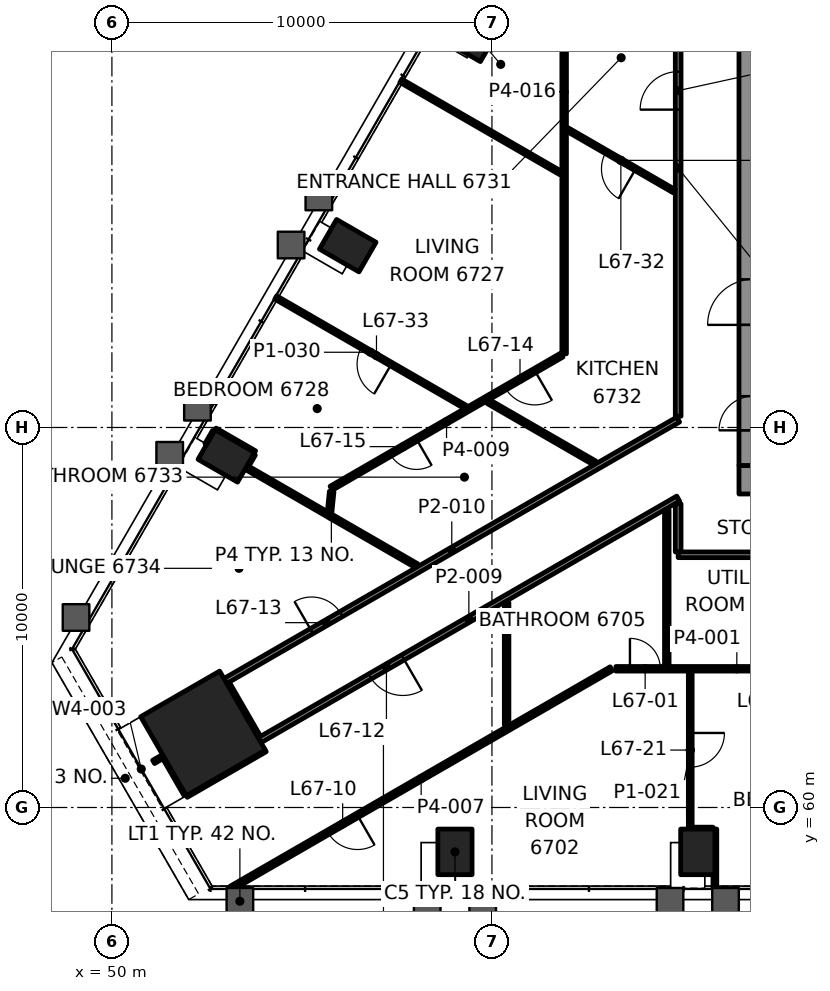
"""IFC4 building model, lengths in metres.
Left out: names, types, materials, properties, quantities, classifications, styles, units other than length and angle.
Written with IfcOpenShell. Run it as: python <this file> out.ifc"""

import sys

from ifc_helpers import new_model, si_unit, direction, frame, frame_2d, origin, origin_2d, place, context, subcontext, project, spatial, rectangle, hollow_rectangle, extrude, element, fill, save


model = new_model("IFC4")
c1 = context("Model", 3, precision=1e-05, world=origin(), true_north=direction((0.0, 1.0)))
c2 = subcontext(c1, "Body", "Model", "MODEL_VIEW")
j1 = project(units=[si_unit("LENGTHUNIT", "METRE"), si_unit("PLANEANGLEUNIT", "RADIAN")], contexts=[c1])
p1 = place(None, origin())
s1 = spatial("IfcSite", under=j1, at=p1, CompositionType="ELEMENT")
p2 = place(p1, origin())
s2 = spatial("IfcBuilding", under=s1, at=p2, CompositionType="ELEMENT")
p3 = place(p2, frame((0.0, 0.0, 281.1)))
s3 = spatial("IfcBuildingStorey", under=s2, at=p3, CompositionType="ELEMENT", Elevation=281.1)
p4 = place(p3, frame((52.396, 61.95, 0.0), z_axis=(0.0, 0.0, 1.0), x_axis=(0.5, -0.866025403784, 0.0)))
e1 = element("IfcColumn", 1, at=p4, inside=s3, PredefinedType="COLUMN", context=c2, shape_type="SweptSolid", body=[
    extrude(rectangle(XDim=2.4, YDim=2.4, at=origin_2d()), origin(), (0.0, 0.0, 1.0), 3.5),
])
for number, where, z_axis, x_axis in (
    (2, (59.027, 58.832, -0.0), (0.0, 0.0, 1.0), (1.0, 0.0, 0.0)),
    (3, (65.416, 58.832, -0.0), (0.0, 0.0, 1.0), (1.0, 0.0, 0.0)),
    (4, (59.401, 80.317, -0.0), (0.0, 0.0, 1.0), (-0.5, -0.866, 0.0)),
    (5, (56.206, 74.784, -0.0), (0.0, 0.0, 1.0), (-0.5, -0.866, 0.0)),
    (6, (53.011, 69.251, -0.0), (0.0, 0.0, 1.0), (-0.5, -0.866, 0.0)),
):
    element("IfcColumn", number, at=place(p3, frame(where, z_axis=z_axis, x_axis=x_axis)), inside=s3, PredefinedType="COLUMN", context=c2, shape_type="SweptSolid", body=[
        extrude(hollow_rectangle(XDim=0.9, YDim=1.2, WallThickness=0.06, at=origin_2d()), origin(), (0.0, 0.0, 1.0), 3.5),
    ])
p5 = place(p3, frame((66.5, 68.625, 0.0), z_axis=(0.0, 0.0, 1.0), x_axis=(1.0, 0.0, 0.0)))
e7 = element("IfcWall", 7, at=p5, inside=s3, PredefinedType="SHEAR", context=c2, shape_type="SweptSolid", body=[
    extrude(rectangle(XDim=17.0, YDim=0.75, at=frame_2d((8.5, 0.0))), origin(), (0.0, 0.0, 1.0), 3.3),
])
p6 = place(p5, frame((2.7, 0.0, 0.0)))
e8 = element("IfcOpeningElement", 8, at=p6, cuts=e7, PredefinedType="OPENING", context=c2, shape_type="SweptSolid", body=[
    extrude(rectangle(XDim=0.9, YDim=2.1, at=frame_2d((0.45, 1.05))), frame((0.0, 0.385, 0.0), z_axis=(0.0, -1.0, 0.0), x_axis=(1.0, 0.0, 0.0)), (0.0, 0.0, 1.0), 0.77),
])
p7 = place(p3, frame((66.875, 69.0, 0.0), z_axis=(0.0, 0.0, 1.0), x_axis=(0.0, 1.0, 0.0)))
e9 = element("IfcWall", 9, at=p7, inside=s3, PredefinedType="SHEAR", context=c2, shape_type="SweptSolid", body=[
    extrude(rectangle(XDim=12.0, YDim=0.75, at=frame_2d((6.0, 0.0))), origin(), (0.0, 0.0, 1.0), 3.3),
])
p8 = place(p7, frame((3.7, 0.0, 0.0)))
e10 = element("IfcOpeningElement", 10, at=p8, cuts=e9, PredefinedType="OPENING", context=c2, shape_type="SweptSolid", body=[
    extrude(rectangle(XDim=1.2, YDim=2.1, at=frame_2d((0.6, 1.05))), frame((0.0, 0.385, 0.0), z_axis=(0.0, -1.0, 0.0), x_axis=(1.0, 0.0, 0.0)), (0.0, 0.0, 1.0), 0.77),
])
p9 = place(p7, frame((0.925, 0.0, 0.0)))
e11 = element("IfcOpeningElement", 11, at=p9, cuts=e9, PredefinedType="OPENING", context=c2, shape_type="SweptSolid", body=[
    extrude(rectangle(XDim=0.9, YDim=2.1, at=frame_2d((0.45, 1.05))), frame((0.0, 0.385, 0.0), z_axis=(0.0, -1.0, 0.0), x_axis=(1.0, 0.0, 0.0)), (0.0, 0.0, 1.0), 0.77),
])
p10 = place(p3, frame((65.268, 59.432, 0.0), z_axis=(0.0, 0.0, 1.0), x_axis=(1.0, 0.0, 0.0)))
e12 = element("IfcWall", 12, at=p10, inside=s3, PredefinedType="PARTITIONING", context=c2, shape_type="SweptSolid", body=[
    extrude(rectangle(XDim=0.548, YDim=0.1, at=frame_2d((0.274, 0.0))), origin(), (0.0, 0.0, 1.0), 2.7),
])
p11 = place(p3, frame((63.261, 63.65, 0.0), z_axis=(0.0, 0.0, 1.0), x_axis=(1.0, 0.0, 0.0)))
e13 = element("IfcWall", 13, at=p11, inside=s3, PredefinedType="PARTITIONING", context=c2, shape_type="SweptSolid", body=[
    extrude(rectangle(XDim=6.364, YDim=0.12, at=frame_2d((3.182, 0.0))), origin(), (0.0, 0.0, 1.0), 2.7),
])
p12 = place(p11, frame((0.37, 0.0, 0.0)))
e14 = element("IfcOpeningElement", 14, at=p12, cuts=e13, PredefinedType="OPENING", context=c2, shape_type="SweptSolid", body=[
    extrude(rectangle(XDim=0.8, YDim=2.1, at=frame_2d((0.4, 1.05))), frame((0.0, 0.07, 0.0), z_axis=(0.0, -1.0, 0.0), x_axis=(1.0, 0.0, 0.0)), (0.0, 0.0, 1.0), 0.14),
])
p13 = place(p11, frame((3.609, 0.0, 0.0)))
e15 = element("IfcOpeningElement", 15, at=p13, cuts=e13, PredefinedType="OPENING", context=c2, shape_type="SweptSolid", body=[
    extrude(rectangle(XDim=0.9, YDim=2.1, at=frame_2d((0.45, 1.05))), frame((0.0, 0.07, 0.0), z_axis=(0.0, -1.0, 0.0), x_axis=(1.0, 0.0, 0.0)), (0.0, 0.0, 1.0), 0.14),
])
p14 = place(p3, frame((85.1, 66.65, 0.0), z_axis=(0.0, 0.0, 1.0), x_axis=(-1.0, 0.0, 0.0)))
e16 = element("IfcWall", 16, at=p14, inside=s3, PredefinedType="PARTITIONING", context=c2, shape_type="SweptSolid", body=[
    extrude(rectangle(XDim=20.2, YDim=0.15, at=frame_2d((10.1, 0.0))), origin(), (0.0, 0.0, 1.0), 2.7),
])
p15 = place(p14, frame((6.405, 0.0, 0.0)))
e17 = element("IfcOpeningElement", 17, at=p15, cuts=e16, PredefinedType="OPENING", context=c2, shape_type="SweptSolid", body=[
    extrude(rectangle(XDim=1.0, YDim=2.1, at=frame_2d((0.5, 1.05))), frame((0.0, 0.085, 0.0), z_axis=(0.0, -1.0, 0.0), x_axis=(1.0, 0.0, 0.0)), (0.0, 0.0, 1.0), 0.17),
])
p16 = place(p14, frame((12.845, 0.0, 0.0)))
e18 = element("IfcOpeningElement", 18, at=p16, cuts=e16, PredefinedType="OPENING", context=c2, shape_type="SweptSolid", body=[
    extrude(rectangle(XDim=0.9, YDim=2.1, at=frame_2d((0.45, 1.05))), frame((0.0, 0.085, 0.0), z_axis=(0.0, -1.0, 0.0), x_axis=(1.0, 0.0, 0.0)), (0.0, 0.0, 1.0), 0.17),
])
p17 = place(p3, frame((63.141, 63.65, 0.0), z_axis=(0.0, 0.0, 1.0), x_axis=(-0.866023045711, -0.500004084281, 0.0)))
e19 = element("IfcWall", 19, at=p17, inside=s3, PredefinedType="PARTITIONING", context=c2, shape_type="SweptSolid", body=[
    extrude(rectangle(XDim=11.556, YDim=0.12, at=frame_2d((5.778, 0.0))), origin(), (0.0, 0.0, 1.0), 2.7),
])
p18 = place(p17, frame((7.713, 0.0, 0.0)))
e20 = element("IfcOpeningElement", 20, at=p18, cuts=e19, PredefinedType="OPENING", context=c2, shape_type="SweptSolid", body=[
    extrude(rectangle(XDim=0.9, YDim=2.1, at=frame_2d((0.45, 1.05))), frame((0.0, 0.07, 0.0), z_axis=(0.0, -1.0, 0.0), x_axis=(1.0, 0.0, 0.0)), (0.0, 0.0, 1.0), 0.14),
])
p19 = place(p3, frame((51.957, 60.311, 0.0), z_axis=(0.0, 0.0, 1.0), x_axis=(0.866036455013, 0.499980858223, 0.0)))
e21 = element("IfcWall", 21, at=p19, inside=s3, PredefinedType="PARTITIONING", context=c2, shape_type="SweptSolid", body=[
    extrude(rectangle(XDim=2.399, YDim=0.1, at=frame_2d((1.199, 0.0))), origin(), (0.0, 0.0, 1.0), 2.7),
])
p20 = place(p3, frame((64.9, 68.13, 0.0), z_axis=(0.0, 0.0, 1.0), x_axis=(-0.866023199005, -0.500003818771, 0.0)))
e22 = element("IfcWall", 22, at=p20, inside=s3, PredefinedType="PARTITIONING", context=c2, shape_type="SweptSolid", body=[
    extrude(rectangle(XDim=12.719, YDim=0.15, at=frame_2d((6.359, 0.0))), origin(), (0.0, 0.0, 1.0), 2.547),
])
p21 = place(p20, frame((8.364, 0.0, 0.0)))
e23 = element("IfcOpeningElement", 23, at=p21, cuts=e22, PredefinedType="OPENING", context=c2, shape_type="SweptSolid", body=[
    extrude(rectangle(XDim=1.0, YDim=2.1, at=frame_2d((0.5, 1.05))), frame((0.0, 0.085, 0.0), z_axis=(0.0, -1.0, 0.0), x_axis=(1.0, 0.0, 0.0)), (0.0, 0.0, 1.0), 0.17),
])
p22 = place(p3, frame((51.097, 61.2, 0.0), z_axis=(0.0, 0.0, 1.0), x_axis=(0.866006330792, 0.500033033937, 0.0)))
e24 = element("IfcWall", 24, at=p22, inside=s3, PredefinedType="PARTITIONING", context=c2, shape_type="SweptSolid", body=[
    extrude(rectangle(XDim=0.25, YDim=0.1, at=frame_2d((0.125, 0.0))), origin(), (0.0, 0.0, 1.0), 2.7),
])
p23 = place(p3, frame((52.986, 63.329, 0.0), z_axis=(0.0, 0.0, 1.0), x_axis=(0.866027482275, 0.499996399932, 0.0)))
e25 = element("IfcWall", 25, at=p23, inside=s3, PredefinedType="PARTITIONING", context=c2, shape_type="SweptSolid", body=[
    extrude(rectangle(XDim=13.757, YDim=0.15, at=frame_2d((6.879, 0.0))), origin(), (0.0, 0.0, 1.0), 2.7),
])
p24 = place(p23, frame((2.62, 0.0, 0.0)))
e26 = element("IfcOpeningElement", 26, at=p24, cuts=e25, PredefinedType="OPENING", context=c2, shape_type="SweptSolid", body=[
    extrude(rectangle(XDim=0.9, YDim=2.1, at=frame_2d((0.45, 1.05))), frame((0.0, 0.085, 0.0), z_axis=(0.0, -1.0, 0.0), x_axis=(1.0, 0.0, 0.0)), (0.0, 0.0, 1.0), 0.17),
])
p25 = place(p3, frame((61.84, 71.906, 0.0), z_axis=(0.0, 0.0, 1.0), x_axis=(-0.866015603583, -0.500016974063, 0.0)))
e27 = element("IfcWall", 27, at=p25, inside=s3, PredefinedType="PARTITIONING", context=c2, shape_type="SweptSolid", body=[
    extrude(rectangle(XDim=7.008, YDim=0.12, at=frame_2d((3.504, 0.0))), origin(), (0.0, 0.0, 1.0), 2.7),
])
p26 = place(p25, frame((0.822, 0.0, 0.0)))
e28 = element("IfcOpeningElement", 28, at=p26, cuts=e27, PredefinedType="OPENING", context=c2, shape_type="SweptSolid", body=[
    extrude(rectangle(XDim=0.9, YDim=2.1, at=frame_2d((0.45, 1.05))), frame((0.0, 0.07, 0.0), z_axis=(0.0, -1.0, 0.0), x_axis=(1.0, 0.0, 0.0)), (0.0, 0.0, 1.0), 0.14),
])
p27 = place(p25, frame((4.418, 0.0, 0.0)))
e29 = element("IfcOpeningElement", 29, at=p27, cuts=e27, PredefinedType="OPENING", context=c2, shape_type="SweptSolid", body=[
    extrude(rectangle(XDim=0.8, YDim=2.1, at=frame_2d((0.4, 1.05))), frame((0.0, 0.07, 0.0), z_axis=(0.0, -1.0, 0.0), x_axis=(1.0, 0.0, 0.0)), (0.0, 0.0, 1.0), 0.14),
])
p28 = place(p3, frame((53.561, 69.003, 0.0), z_axis=(0.0, 0.0, 1.0), x_axis=(0.500241622161, 0.865885858216, 0.0)))
e30 = element("IfcWall", 30, at=p28, inside=s3, PredefinedType="PARTITIONING", context=c2, shape_type="SweptSolid", body=[
    extrude(rectangle(XDim=0.339, YDim=0.1, at=frame_2d((0.169, 0.0))), origin(), (0.0, 0.0, 1.0), 2.7),
])
p29 = place(p3, frame((52.491, 69.551, 0.0), z_axis=(0.0, 0.0, 1.0), x_axis=(0.499951716245, 0.866053278629, 0.0)))
e31 = element("IfcWall", 31, at=p29, inside=s3, PredefinedType="PARTITIONING", context=c2, shape_type="SweptSolid", body=[
    extrude(rectangle(XDim=0.399, YDim=0.1, at=frame_2d((0.2, 0.0))), origin(), (0.0, 0.0, 1.0), 2.7),
])
p30 = place(p3, frame((55.729, 67.781, 0.0), z_axis=(0.0, 0.0, 1.0), x_axis=(0.099548724898, 0.995032688594, 0.0)))
e32 = element("IfcWall", 32, at=p30, inside=s3, PredefinedType="PARTITIONING", context=c2, shape_type="SweptSolid", body=[
    extrude(rectangle(XDim=0.537, YDim=0.12, at=frame_2d((0.269, 0.0))), origin(), (0.0, 0.0, 1.0), 2.7),
])
p31 = place(p3, frame((65.866, 57.872, 0.0), z_axis=(0.0, 0.0, 1.0), x_axis=(0.0, 1.0, 0.0)))
e33 = element("IfcWall", 33, at=p31, inside=s3, PredefinedType="PARTITIONING", context=c2, shape_type="SweptSolid", body=[
    extrude(rectangle(XDim=1.56, YDim=0.1, at=frame_2d((0.78, 0.0))), origin(), (0.0, 0.0, 1.0), 2.688),
])
p32 = place(p3, frame((65.218, 63.59, 0.0), z_axis=(0.0, 0.0, 1.0), x_axis=(0.0, -1.0, 0.0)))
e34 = element("IfcWall", 34, at=p32, inside=s3, PredefinedType="PARTITIONING", context=c2, shape_type="SweptSolid", body=[
    extrude(rectangle(XDim=4.158, YDim=0.1, at=frame_2d((2.079, 0.0))), origin(), (0.0, 0.0, 1.0), 2.7),
])
p33 = place(p32, frame((1.629, 0.0, 0.0)))
e35 = element("IfcOpeningElement", 35, at=p33, cuts=e34, PredefinedType="OPENING", context=c2, shape_type="SweptSolid", body=[
    extrude(rectangle(XDim=0.9, YDim=2.1, at=frame_2d((0.45, 1.05))), frame((0.0, 0.06, 0.0), z_axis=(0.0, -1.0, 0.0), x_axis=(1.0, 0.0, 0.0)), (0.0, 0.0, 1.0), 0.12),
])
p34 = place(p3, frame((64.9, 66.725, 0.0), z_axis=(0.0, 0.0, 1.0), x_axis=(0.0, 1.0, 0.0)))
e36 = element("IfcWall", 36, at=p34, inside=s3, PredefinedType="PARTITIONING", context=c2, shape_type="SweptSolid", body=[
    extrude(rectangle(XDim=1.268, YDim=0.15, at=frame_2d((0.634, 0.0))), origin(), (0.0, 0.0, 1.0), 2.547),
])
p35 = place(p3, frame((64.9, 70.295, 0.0), z_axis=(0.0, 0.0, 1.0), x_axis=(0.0, 1.0, 0.0)))
e37 = element("IfcWall", 37, at=p35, inside=s3, PredefinedType="PARTITIONING", context=c2, shape_type="SweptSolid", body=[
    extrude(rectangle(XDim=13.055, YDim=0.15, at=frame_2d((6.528, 0.0))), origin(), (0.0, 0.0, 1.0), 2.7),
])
p36 = place(p35, frame((8.07, 0.0, 0.0)))
e38 = element("IfcOpeningElement", 38, at=p36, cuts=e37, PredefinedType="OPENING", context=c2, shape_type="SweptSolid", body=[
    extrude(rectangle(XDim=1.0, YDim=2.1, at=frame_2d((0.5, 1.05))), frame((0.0, 0.085, 0.0), z_axis=(0.0, -1.0, 0.0), x_axis=(1.0, 0.0, 0.0)), (0.0, 0.0, 1.0), 0.17),
])
p37 = place(p3, frame((64.601, 63.71, 0.0), z_axis=(0.0, 0.0, 1.0), x_axis=(0.0, 1.0, 0.0)))
e39 = element("IfcWall", 39, at=p37, inside=s3, PredefinedType="PARTITIONING", context=c2, shape_type="SweptSolid", body=[
    extrude(rectangle(XDim=4.12, YDim=0.12, at=frame_2d((2.06, 0.0))), origin(), (0.0, 0.0, 1.0), 2.547),
])
p38 = place(p3, frame((61.9, 71.94, 0.0), z_axis=(0.0, 0.0, 1.0), x_axis=(0.0, 1.0, 0.0)))
e40 = element("IfcWall", 40, at=p38, inside=s3, PredefinedType="PARTITIONING", context=c2, shape_type="SweptSolid", body=[
    extrude(rectangle(XDim=13.792, YDim=0.12, at=frame_2d((6.896, 0.0))), origin(), (0.0, 0.0, 1.0), 2.688),
])
p39 = place(p38, frame((8.206, 0.0, 0.0)))
e41 = element("IfcOpeningElement", 41, at=p39, cuts=e40, PredefinedType="OPENING", context=c2, shape_type="SweptSolid", body=[
    extrude(rectangle(XDim=0.9, YDim=2.1, at=frame_2d((0.45, 1.05))), frame((0.0, 0.07, 0.0), z_axis=(0.0, -1.0, 0.0), x_axis=(1.0, 0.0, 0.0)), (0.0, 0.0, 1.0), 0.14),
])
p40 = place(p3, frame((60.386, 62.169, 0.0), z_axis=(0.0, 0.0, 1.0), x_axis=(0.0, 1.0, 0.0)))
e42 = element("IfcWall", 42, at=p40, inside=s3, PredefinedType="PARTITIONING", context=c2, shape_type="SweptSolid", body=[
    extrude(rectangle(XDim=3.228, YDim=0.12, at=frame_2d((1.614, 0.0))), origin(), (0.0, 0.0, 1.0), 2.547),
])
p41 = place(p3, frame((53.845, 61.84, 0.0), z_axis=(0.0, 0.0, 1.0), x_axis=(-0.499988108725, 0.866032269107, 0.0)))
e43 = element("IfcWall", 43, at=p41, inside=s3, PredefinedType="PARTITIONING", context=c2, shape_type="SweptSolid", body=[
    extrude(rectangle(XDim=1.644, YDim=0.15, at=frame_2d((0.822, 0.0))), origin(), (0.0, 0.0, 1.0), 2.547),
])
p42 = place(p3, frame((51.931, 60.354, 0.0), z_axis=(0.0, 0.0, 1.0), x_axis=(-0.499955427682, 0.866051136095, 0.0)))
e44 = element("IfcWall", 44, at=p42, inside=s3, PredefinedType="PARTITIONING", context=c2, shape_type="SweptSolid", body=[
    extrude(rectangle(XDim=1.149, YDim=0.1, at=frame_2d((0.574, 0.0))), origin(), (0.0, 0.0, 1.0), 2.7),
])
p43 = place(p3, frame((64.799, 76.217, 0.0), z_axis=(0.0, 0.0, 1.0), x_axis=(-0.866000336211, 0.500043415797, 0.0)))
e45 = element("IfcWall", 45, at=p43, inside=s3, PredefinedType="PARTITIONING", context=c2, shape_type="SweptSolid", body=[
    extrude(rectangle(XDim=3.248, YDim=0.1, at=frame_2d((1.624, 0.0))), origin(), (0.0, 0.0, 1.0), 2.7),
])
p44 = place(p43, frame((1.174, 0.0, 0.0)))
e46 = element("IfcOpeningElement", 46, at=p44, cuts=e45, PredefinedType="OPENING", context=c2, shape_type="SweptSolid", body=[
    extrude(rectangle(XDim=0.9, YDim=2.1, at=frame_2d((0.45, 1.05))), frame((0.0, 0.06, 0.0), z_axis=(0.0, -1.0, 0.0), x_axis=(1.0, 0.0, 0.0)), (0.0, 0.0, 1.0), 0.12),
])
p45 = place(p3, frame((61.814, 76.693, 0.0), z_axis=(0.0, 0.0, 1.0), x_axis=(-0.866028392017, 0.499994824194, 0.0)))
e47 = element("IfcWall", 47, at=p45, inside=s3, PredefinedType="PARTITIONING", context=c2, shape_type="SweptSolid", body=[
    extrude(rectangle(XDim=4.862, YDim=0.1, at=frame_2d((2.431, 0.0))), origin(), (0.0, 0.0, 1.0), 2.688),
])
p46 = place(p3, frame((62.702, 69.066, 0.0), z_axis=(0.0, 0.0, 1.0), x_axis=(-0.866033195618, 0.499986503906, 0.0)))
e48 = element("IfcWall", 48, at=p46, inside=s3, PredefinedType="PARTITIONING", context=c2, shape_type="SweptSolid", body=[
    extrude(rectangle(XDim=3.228, YDim=0.12, at=frame_2d((1.614, 0.0))), origin(), (0.0, 0.0, 1.0), 2.7),
])
p47 = place(p3, frame((59.301, 70.539, 0.0), z_axis=(0.0, 0.0, 1.0), x_axis=(-0.866021213215, 0.500007258209, 0.0)))
e49 = element("IfcWall", 49, at=p47, inside=s3, PredefinedType="PARTITIONING", context=c2, shape_type="SweptSolid", body=[
    extrude(rectangle(XDim=5.763, YDim=0.1, at=frame_2d((2.882, 0.0))), origin(), (0.0, 0.0, 1.0), 2.7),
])
p48 = place(p47, frame((2.252, 0.0, 0.0)))
e50 = element("IfcOpeningElement", 50, at=p48, cuts=e49, PredefinedType="OPENING", context=c2, shape_type="SweptSolid", body=[
    extrude(rectangle(XDim=0.9, YDim=2.1, at=frame_2d((0.45, 1.05))), frame((0.0, 0.06, 0.0), z_axis=(0.0, -1.0, 0.0), x_axis=(1.0, 0.0, 0.0)), (0.0, 0.0, 1.0), 0.12),
])
p49 = place(p3, frame((53.756, 69.341, 0.0), z_axis=(0.0, 0.0, 1.0), x_axis=(-0.866066905393, 0.499928110214, 0.0)))
e51 = element("IfcWall", 51, at=p49, inside=s3, PredefinedType="PARTITIONING", context=c2, shape_type="SweptSolid", body=[
    extrude(rectangle(XDim=1.199, YDim=0.1, at=frame_2d((0.6, 0.0))), origin(), (0.0, 0.0, 1.0), 2.7),
])
p50 = place(p3, frame((58.017, 66.361, 0.0), z_axis=(0.0, 0.0, 1.0), x_axis=(-0.866018392704, 0.500012143352, 0.0)))
e52 = element("IfcWall", 52, at=p50, inside=s3, PredefinedType="PARTITIONING", context=c2, shape_type="SweptSolid", body=[
    extrude(rectangle(XDim=5.179, YDim=0.12, at=frame_2d((2.59, 0.0))), origin(), (0.0, 0.0, 1.0), 2.7),
])
p51 = place(p3, frame((48.551, 63.887, 0.0), z_axis=(0.0, 0.0, 1.0), x_axis=(0.499986626058, -0.866033125095, 0.0)))
e53 = element("IfcWall", 53, at=p51, inside=s3, PredefinedType="PARAPET", context=c2, shape_type="SweptSolid", body=[
    extrude(rectangle(XDim=7.2, YDim=0.3, at=frame_2d((3.6, 0.0))), origin(), (0.0, 0.0, 1.0), 1.1),
])
p52 = place(p12, origin())
e54 = element("IfcDoor", 54, at=p52, inside=s3, OperationType="SINGLE_SWING_RIGHT", PredefinedType="DOOR", context=c2, shape_type="SweptSolid", body=[
    extrude(rectangle(XDim=0.8, YDim=2.1, at=frame_2d((0.4, 1.05))), frame((0.0, 0.025, 0.0), z_axis=(0.0, -1.0, 0.0), x_axis=(1.0, 0.0, 0.0)), (0.0, 0.0, 1.0), 0.05),
])
fill(e14, e54)
p53 = place(p18, origin())
e55 = element("IfcDoor", 55, at=p53, inside=s3, OperationType="SINGLE_SWING_RIGHT", PredefinedType="DOOR", context=c2, shape_type="SweptSolid", body=[
    extrude(rectangle(XDim=0.9, YDim=2.1, at=frame_2d((0.45, 1.05))), frame((0.0, 0.025, 0.0), z_axis=(0.0, -1.0, 0.0), x_axis=(1.0, 0.0, 0.0)), (0.0, 0.0, 1.0), 0.05),
])
fill(e20, e55)
p54 = place(p21, origin())
e56 = element("IfcDoor", 56, at=p54, inside=s3, OperationType="SINGLE_SWING_LEFT", PredefinedType="DOOR", context=c2, shape_type="SweptSolid", body=[
    extrude(rectangle(XDim=1.0, YDim=2.1, at=frame_2d((0.5, 1.05))), frame((0.0, 0.025, 0.0), z_axis=(0.0, -1.0, 0.0), x_axis=(1.0, 0.0, 0.0)), (0.0, 0.0, 1.0), 0.05),
])
fill(e23, e56)
p55 = place(p24, origin())
e57 = element("IfcDoor", 57, at=p55, inside=s3, OperationType="SINGLE_SWING_LEFT", PredefinedType="DOOR", context=c2, shape_type="SweptSolid", body=[
    extrude(rectangle(XDim=0.9, YDim=2.1, at=frame_2d((0.45, 1.05))), frame((0.0, 0.025, 0.0), z_axis=(0.0, -1.0, 0.0), x_axis=(1.0, 0.0, 0.0)), (0.0, 0.0, 1.0), 0.05),
])
fill(e26, e57)
p56 = place(p26, origin())
e58 = element("IfcDoor", 58, at=p56, inside=s3, OperationType="SINGLE_SWING_LEFT", PredefinedType="DOOR", context=c2, shape_type="SweptSolid", body=[
    extrude(rectangle(XDim=0.9, YDim=2.1, at=frame_2d((0.45, 1.05))), frame((0.0, 0.025, 0.0), z_axis=(0.0, -1.0, 0.0), x_axis=(1.0, 0.0, 0.0)), (0.0, 0.0, 1.0), 0.05),
])
fill(e28, e58)
p57 = place(p27, origin())
e59 = element("IfcDoor", 59, at=p57, inside=s3, OperationType="SINGLE_SWING_LEFT", PredefinedType="DOOR", context=c2, shape_type="SweptSolid", body=[
    extrude(rectangle(XDim=0.8, YDim=2.1, at=frame_2d((0.4, 1.05))), frame((0.0, 0.025, 0.0), z_axis=(0.0, -1.0, 0.0), x_axis=(1.0, 0.0, 0.0)), (0.0, 0.0, 1.0), 0.05),
])
fill(e29, e59)
p58 = place(p33, origin())
e60 = element("IfcDoor", 60, at=p58, inside=s3, OperationType="SINGLE_SWING_RIGHT", PredefinedType="DOOR", context=c2, shape_type="SweptSolid", body=[
    extrude(rectangle(XDim=0.9, YDim=2.1, at=frame_2d((0.45, 1.05))), frame((0.0, 0.025, 0.0), z_axis=(0.0, -1.0, 0.0), x_axis=(1.0, 0.0, 0.0)), (0.0, 0.0, 1.0), 0.05),
])
fill(e35, e60)
p59 = place(p36, origin())
e61 = element("IfcDoor", 61, at=p59, inside=s3, OperationType="SINGLE_SWING_RIGHT", PredefinedType="DOOR", context=c2, shape_type="SweptSolid", body=[
    extrude(rectangle(XDim=1.0, YDim=2.1, at=frame_2d((0.5, 1.05))), frame((0.0, 0.025, 0.0), z_axis=(0.0, -1.0, 0.0), x_axis=(1.0, 0.0, 0.0)), (0.0, 0.0, 1.0), 0.05),
])
fill(e38, e61)
p60 = place(p44, origin())
e62 = element("IfcDoor", 62, at=p60, inside=s3, OperationType="SINGLE_SWING_LEFT", PredefinedType="DOOR", context=c2, shape_type="SweptSolid", body=[
    extrude(rectangle(XDim=0.9, YDim=2.1, at=frame_2d((0.45, 1.05))), frame((0.0, 0.025, 0.0), z_axis=(0.0, -1.0, 0.0), x_axis=(1.0, 0.0, 0.0)), (0.0, 0.0, 1.0), 0.05),
])
fill(e46, e62)
p61 = place(p48, origin())
e63 = element("IfcDoor", 63, at=p61, inside=s3, OperationType="SINGLE_SWING_LEFT", PredefinedType="DOOR", context=c2, shape_type="SweptSolid", body=[
    extrude(rectangle(XDim=0.9, YDim=2.1, at=frame_2d((0.45, 1.05))), frame((0.0, 0.025, 0.0), z_axis=(0.0, -1.0, 0.0), x_axis=(1.0, 0.0, 0.0)), (0.0, 0.0, 1.0), 0.05),
])
fill(e50, e63)
p62 = place(p8, origin())
e64 = element("IfcDoor", 64, at=p62, inside=s3, OperationType="SINGLE_SWING_RIGHT", PredefinedType="DOOR", context=c2, shape_type="SweptSolid", body=[
    extrude(rectangle(XDim=1.2, YDim=2.1, at=frame_2d((0.6, 1.05))), frame((0.0, 0.095, 0.0), z_axis=(0.0, -1.0, 0.0), x_axis=(1.0, 0.0, 0.0)), (0.0, 0.0, 1.0), 0.19),
])
fill(e10, e64)
p63 = place(p9, origin())
e65 = element("IfcDoor", 65, at=p63, inside=s3, OperationType="SINGLE_SWING_RIGHT", PredefinedType="DOOR", context=c2, shape_type="SweptSolid", body=[
    extrude(rectangle(XDim=0.9, YDim=2.1, at=frame_2d((0.45, 1.05))), frame((0.0, 0.095, 0.0), z_axis=(0.0, -1.0, 0.0), x_axis=(1.0, 0.0, 0.0)), (0.0, 0.0, 1.0), 0.19),
])
fill(e11, e65)
save(model, sys.argv[1])
